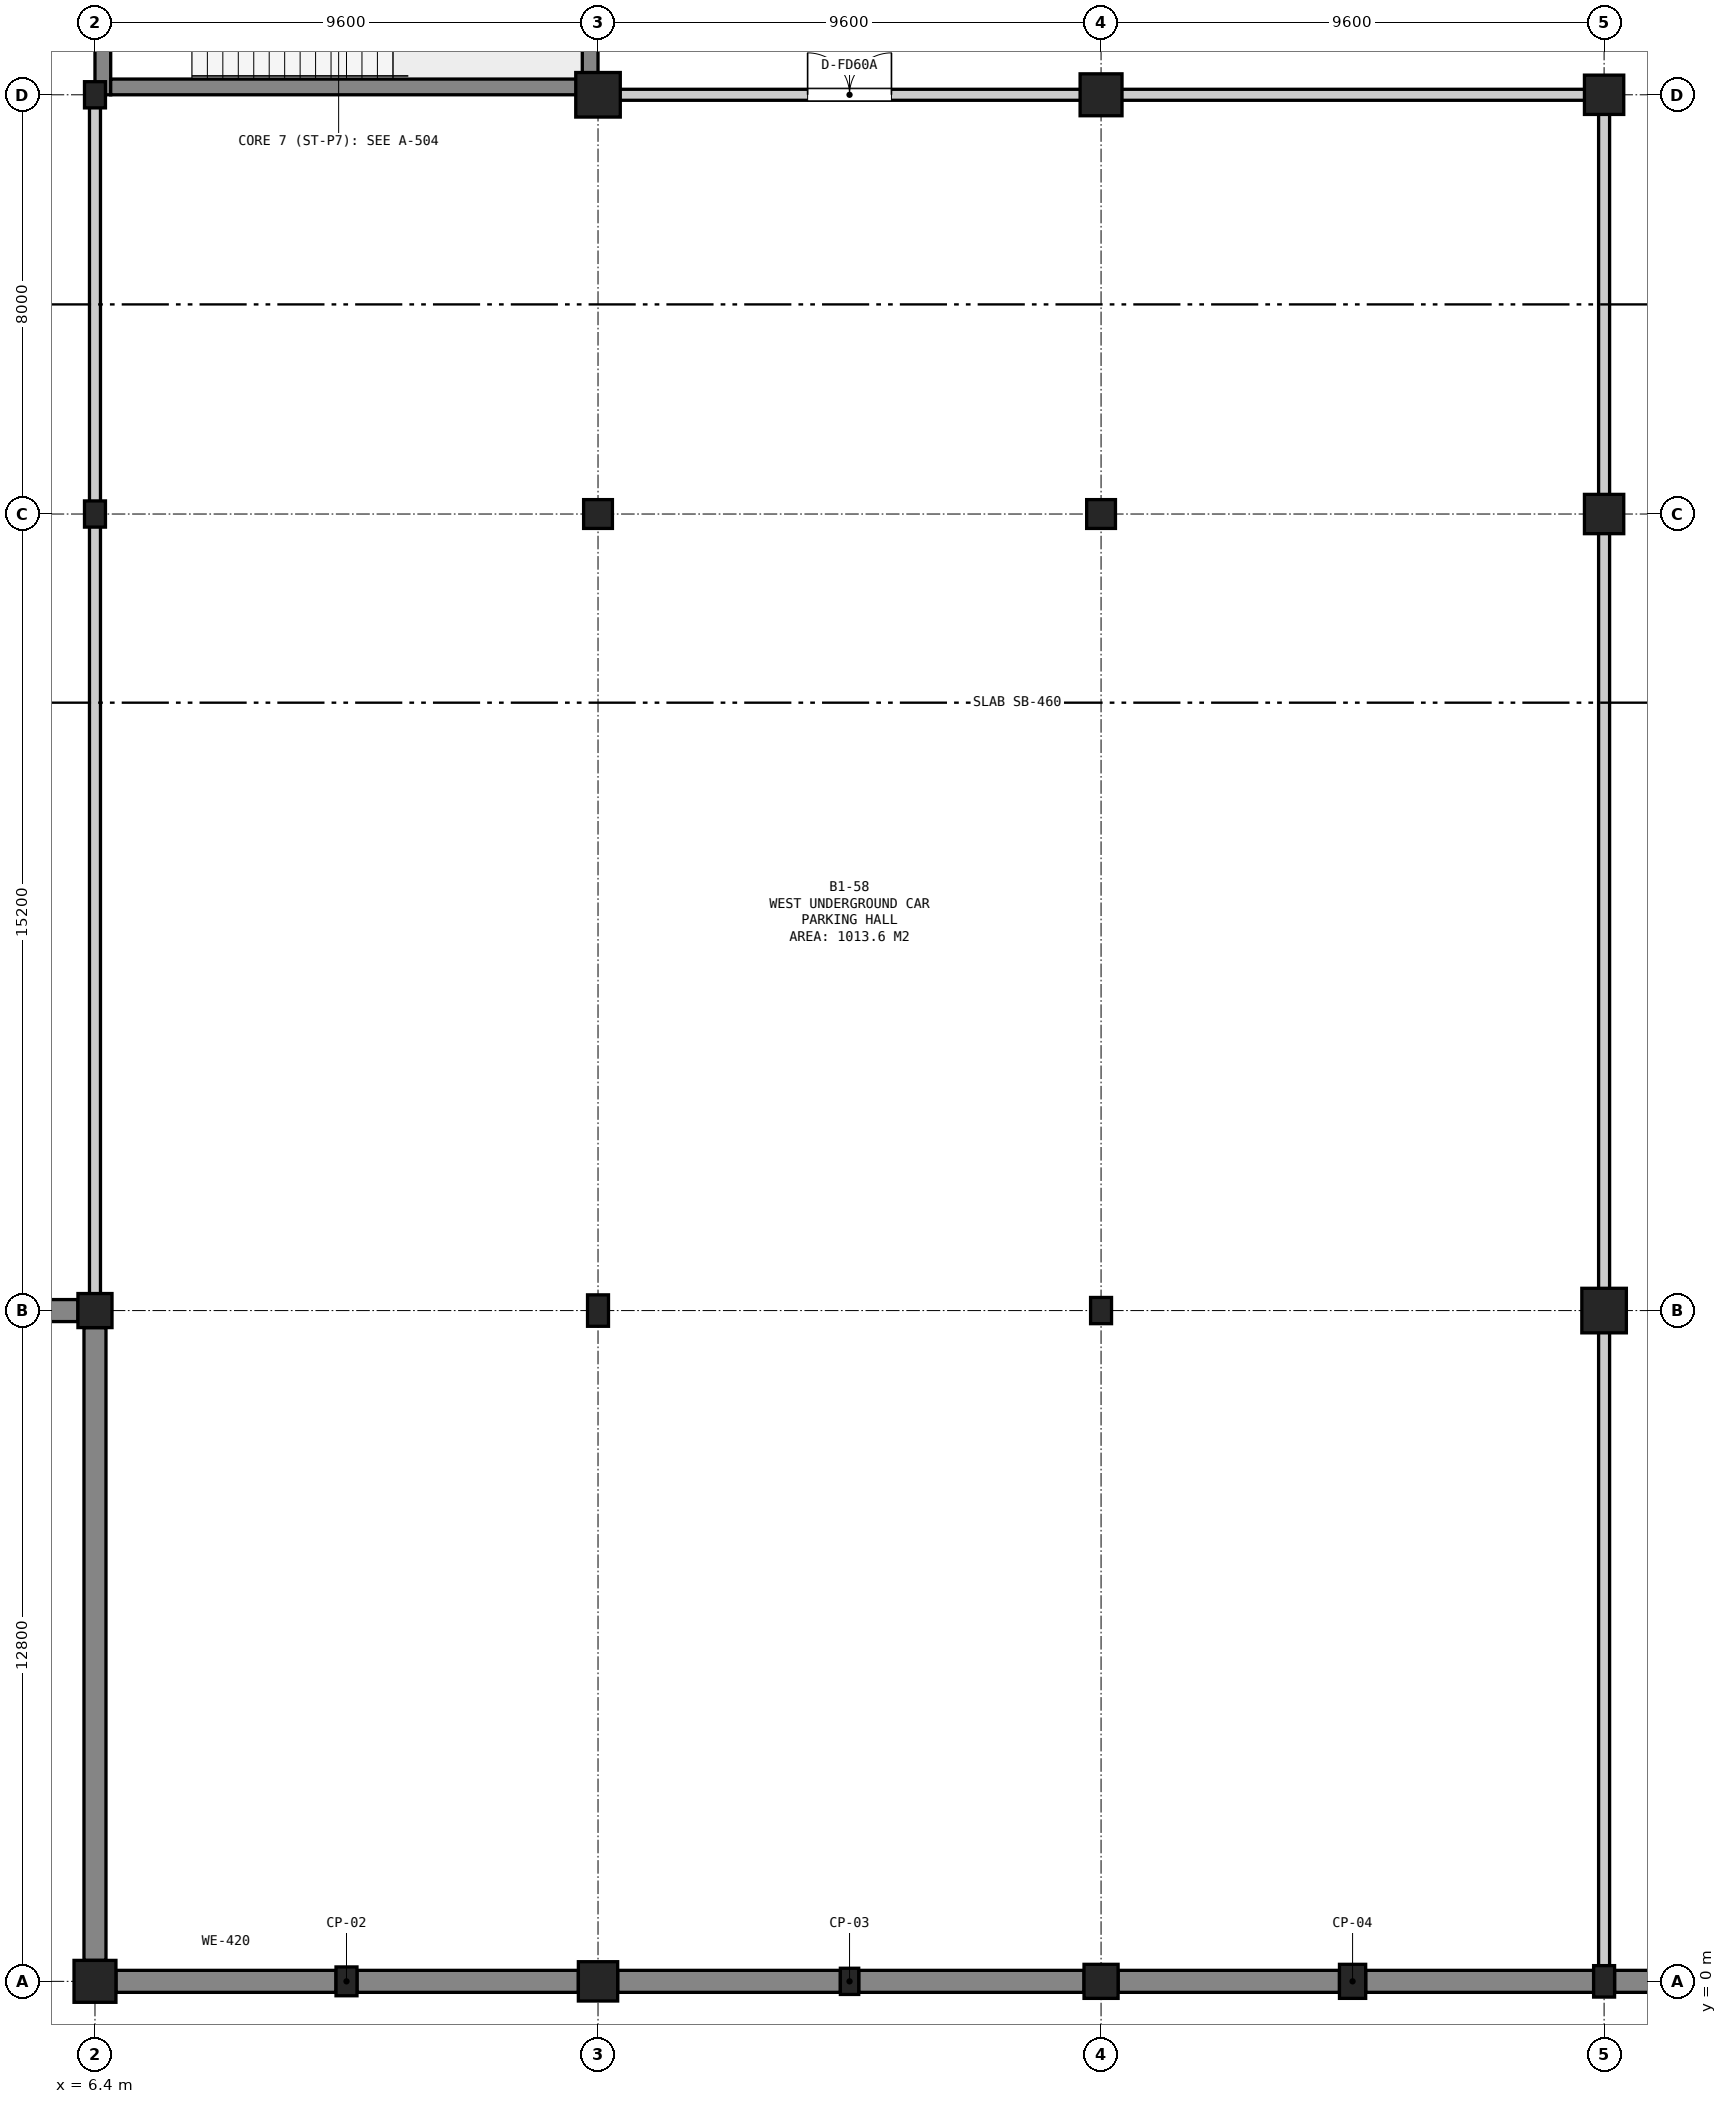
"""IFC4 building model, lengths in metres.
Left out: names, types, materials, properties, quantities, classifications, styles, units other than length and angle.
Written with IfcOpenShell. Run it as: python <this file> out.ifc"""

import sys

from ifc_helpers import new_model, si_unit, direction, frame, frame_2d, origin, origin_2d, place, context, subcontext, project, spatial, rectangle, extrude, element, fill, save


model = new_model("IFC4")
c1 = context("Model", 3, precision=1e-05, world=origin(), true_north=direction((0.0, 1.0)))
c2 = subcontext(c1, "Body", "Model", "MODEL_VIEW")
j1 = project(units=[si_unit("LENGTHUNIT", "METRE"), si_unit("PLANEANGLEUNIT", "RADIAN")], contexts=[c1])
p1 = place(None, origin())
s1 = spatial("IfcSite", under=j1, at=p1, CompositionType="ELEMENT")
p2 = place(p1, origin())
s2 = spatial("IfcBuilding", under=s1, at=p2, CompositionType="ELEMENT")
p3 = place(p2, frame((0.0, 0.0, -4.5)))
s3 = spatial("IfcBuildingStorey", under=s2, at=p3, CompositionType="ELEMENT", Elevation=-4.5)
p4 = place(p3, frame((6.4, 0.0, 0.0), z_axis=(0.0, 0.0, 1.0), x_axis=(1.0, 0.0, 0.0)))
e1 = element("IfcColumn", 1, at=p4, inside=s3, PredefinedType="COLUMN", context=c2, shape_type="SweptSolid", body=[
    extrude(rectangle(XDim=0.8, YDim=0.8, at=origin_2d()), origin(), (0.0, 0.0, 1.0), 4.5),
])
p5 = place(p3, frame((6.4, 12.8, 0.0), z_axis=(0.0, 0.0, 1.0), x_axis=(1.0, 0.0, 0.0)))
e2 = element("IfcColumn", 2, at=p5, inside=s3, PredefinedType="COLUMN", context=c2, shape_type="SweptSolid", body=[
    extrude(rectangle(XDim=0.65, YDim=0.65, at=origin_2d()), origin(), (0.0, 0.0, 1.0), 4.5),
])
for number, where, z_axis, x_axis in (
    (3, (6.4, 28.0, 0.0), (0.0, 0.0, 1.0), (1.0, 0.0, 0.0)),
    (4, (6.4, 36.0, 0.0), (0.0, 0.0, 1.0), (1.0, 0.0, 0.0)),
):
    element("IfcColumn", number, at=place(p3, frame(where, z_axis=z_axis, x_axis=x_axis)), inside=s3, PredefinedType="COLUMN", context=c2, shape_type="SweptSolid", body=[
        extrude(rectangle(XDim=0.4, YDim=0.5, at=origin_2d()), origin(), (0.0, 0.0, 1.0), 4.5),
    ])
p6 = place(p3, frame((16.0, 0.0, 0.0), z_axis=(0.0, 0.0, 1.0), x_axis=(1.0, 0.0, 0.0)))
e5 = element("IfcColumn", 5, at=p6, inside=s3, PredefinedType="COLUMN", context=c2, shape_type="SweptSolid", body=[
    extrude(rectangle(XDim=0.75, YDim=0.75, at=origin_2d()), origin(), (0.0, 0.0, 1.0), 4.5),
])
p7 = place(p3, frame((16.0, 12.8, 0.0), z_axis=(0.0, 0.0, 1.0), x_axis=(1.0, 0.0, 0.0)))
e6 = element("IfcColumn", 6, at=p7, inside=s3, PredefinedType="COLUMN", context=c2, shape_type="SweptSolid", body=[
    extrude(rectangle(XDim=0.4, YDim=0.6, at=origin_2d()), origin(), (0.0, 0.0, 1.0), 4.5),
])
p8 = place(p3, frame((16.0, 28.0, 0.0), z_axis=(0.0, 0.0, 1.0), x_axis=(1.0, 0.0, 0.0)))
e7 = element("IfcColumn", 7, at=p8, inside=s3, PredefinedType="COLUMN", context=c2, shape_type="SweptSolid", body=[
    extrude(rectangle(XDim=0.55, YDim=0.55, at=origin_2d()), origin(), (0.0, 0.0, 1.0), 4.5),
])
p9 = place(p3, frame((16.0, 36.0, 0.0), z_axis=(0.0, 0.0, 1.0), x_axis=(1.0, 0.0, 0.0)))
e8 = element("IfcColumn", 8, at=p9, inside=s3, PredefinedType="COLUMN", context=c2, shape_type="SweptSolid", body=[
    extrude(rectangle(XDim=0.85, YDim=0.85, at=origin_2d()), origin(), (0.0, 0.0, 1.0), 4.5),
])
p10 = place(p3, frame((25.6, 0.0, 0.0), z_axis=(0.0, 0.0, 1.0), x_axis=(1.0, 0.0, 0.0)))
e9 = element("IfcColumn", 9, at=p10, inside=s3, PredefinedType="COLUMN", context=c2, shape_type="SweptSolid", body=[
    extrude(rectangle(XDim=0.65, YDim=0.65, at=origin_2d()), origin(), (0.0, 0.0, 1.0), 4.5),
])
p11 = place(p3, frame((25.6, 12.8, 0.0), z_axis=(0.0, 0.0, 1.0), x_axis=(1.0, 0.0, 0.0)))
e10 = element("IfcColumn", 10, at=p11, inside=s3, PredefinedType="COLUMN", context=c2, shape_type="SweptSolid", body=[
    extrude(rectangle(XDim=0.4, YDim=0.5, at=origin_2d()), origin(), (0.0, 0.0, 1.0), 4.5),
])
p12 = place(p3, frame((25.6, 28.0, 0.0), z_axis=(0.0, 0.0, 1.0), x_axis=(1.0, 0.0, 0.0)))
e11 = element("IfcColumn", 11, at=p12, inside=s3, PredefinedType="COLUMN", context=c2, shape_type="SweptSolid", body=[
    extrude(rectangle(XDim=0.55, YDim=0.55, at=origin_2d()), origin(), (0.0, 0.0, 1.0), 4.5),
])
p13 = place(p3, frame((25.6, 36.0, 0.0), z_axis=(0.0, 0.0, 1.0), x_axis=(1.0, 0.0, 0.0)))
e12 = element("IfcColumn", 12, at=p13, inside=s3, PredefinedType="COLUMN", context=c2, shape_type="SweptSolid", body=[
    extrude(rectangle(XDim=0.8, YDim=0.8, at=origin_2d()), origin(), (0.0, 0.0, 1.0), 4.5),
])
p14 = place(p3, frame((35.2, 0.0, 0.0), z_axis=(0.0, 0.0, 1.0), x_axis=(1.0, 0.0, 0.0)))
e13 = element("IfcColumn", 13, at=p14, inside=s3, PredefinedType="COLUMN", context=c2, shape_type="SweptSolid", body=[
    extrude(rectangle(XDim=0.4, YDim=0.6, at=origin_2d()), origin(), (0.0, 0.0, 1.0), 4.5),
])
p15 = place(p3, frame((35.2, 12.8, 0.0), z_axis=(0.0, 0.0, 1.0), x_axis=(1.0, 0.0, 0.0)))
e14 = element("IfcColumn", 14, at=p15, inside=s3, PredefinedType="COLUMN", context=c2, shape_type="SweptSolid", body=[
    extrude(rectangle(XDim=0.85, YDim=0.85, at=origin_2d()), origin(), (0.0, 0.0, 1.0), 4.5),
])
for number, where, z_axis, x_axis in (
    (15, (35.2, 28.0, 0.0), (0.0, 0.0, 1.0), (1.0, 0.0, 0.0)),
    (16, (35.2, 36.0, 0.0), (0.0, 0.0, 1.0), (1.0, 0.0, 0.0)),
):
    element("IfcColumn", number, at=place(p3, frame(where, z_axis=z_axis, x_axis=x_axis)), inside=s3, PredefinedType="COLUMN", context=c2, shape_type="SweptSolid", body=[
        extrude(rectangle(XDim=0.75, YDim=0.75, at=origin_2d()), origin(), (0.0, 0.0, 1.0), 4.5),
    ])
p16 = place(p3, frame((11.2, 0.0, 0.0), z_axis=(0.0, 0.0, 1.0), x_axis=(1.0, 0.0, 0.0)))
e17 = element("IfcColumn", 17, at=p16, inside=s3, PredefinedType="PILASTER", context=c2, shape_type="SweptSolid", body=[
    extrude(rectangle(XDim=0.4, YDim=0.55, at=origin_2d()), origin(), (0.0, 0.0, 1.0), 4.5),
])
p17 = place(p3, frame((20.8, 0.0, 0.0), z_axis=(0.0, 0.0, 1.0), x_axis=(1.0, 0.0, 0.0)))
e18 = element("IfcColumn", 18, at=p17, inside=s3, PredefinedType="PILASTER", context=c2, shape_type="SweptSolid", body=[
    extrude(rectangle(XDim=0.35, YDim=0.5, at=origin_2d()), origin(), (0.0, 0.0, 1.0), 4.5),
])
p18 = place(p3, frame((30.4, 0.0, 0.0), z_axis=(0.0, 0.0, 1.0), x_axis=(1.0, 0.0, 0.0)))
e19 = element("IfcColumn", 19, at=p18, inside=s3, PredefinedType="PILASTER", context=c2, shape_type="SweptSolid", body=[
    extrude(rectangle(XDim=0.5, YDim=0.65, at=origin_2d()), origin(), (0.0, 0.0, 1.0), 4.5),
])
p19 = place(p3, frame((6.8, 0.0, 0.0), z_axis=(0.0, 0.0, 1.0), x_axis=(1.0, 0.0, 0.0)))
e20 = element("IfcWall", 20, at=p19, inside=s3, PredefinedType="SOLIDWALL", context=c2, shape_type="SweptSolid", body=[
    extrude(rectangle(XDim=4.2, YDim=0.42, at=frame_2d((2.1, 0.0))), origin(), (0.0, 0.0, 1.0), 4.08),
])
p20 = place(p3, frame((11.4, 0.0, 0.0), z_axis=(0.0, 0.0, 1.0), x_axis=(1.0, 0.0, 0.0)))
e21 = element("IfcWall", 21, at=p20, inside=s3, PredefinedType="SOLIDWALL", context=c2, shape_type="SweptSolid", body=[
    extrude(rectangle(XDim=4.225, YDim=0.42, at=frame_2d((2.113, 0.0))), origin(), (0.0, 0.0, 1.0), 4.08),
])
p21 = place(p3, frame((16.375, 0.0, 0.0), z_axis=(0.0, 0.0, 1.0), x_axis=(1.0, 0.0, 0.0)))
e22 = element("IfcWall", 22, at=p21, inside=s3, PredefinedType="SOLIDWALL", context=c2, shape_type="SweptSolid", body=[
    extrude(rectangle(XDim=4.25, YDim=0.42, at=frame_2d((2.125, 0.0))), origin(), (0.0, 0.0, 1.0), 4.08),
])
p22 = place(p3, frame((20.975, 0.0, 0.0), z_axis=(0.0, 0.0, 1.0), x_axis=(1.0, 0.0, 0.0)))
e23 = element("IfcWall", 23, at=p22, inside=s3, PredefinedType="SOLIDWALL", context=c2, shape_type="SweptSolid", body=[
    extrude(rectangle(XDim=4.3, YDim=0.42, at=frame_2d((2.15, 0.0))), origin(), (0.0, 0.0, 1.0), 4.08),
])
p23 = place(p3, frame((25.925, 0.0, 0.0), z_axis=(0.0, 0.0, 1.0), x_axis=(1.0, 0.0, 0.0)))
e24 = element("IfcWall", 24, at=p23, inside=s3, PredefinedType="SOLIDWALL", context=c2, shape_type="SweptSolid", body=[
    extrude(rectangle(XDim=4.225, YDim=0.42, at=frame_2d((2.112, 0.0))), origin(), (0.0, 0.0, 1.0), 4.08),
])
p24 = place(p3, frame((30.65, 0.0, 0.0), z_axis=(0.0, 0.0, 1.0), x_axis=(1.0, 0.0, 0.0)))
e25 = element("IfcWall", 25, at=p24, inside=s3, PredefinedType="SOLIDWALL", context=c2, shape_type="SweptSolid", body=[
    extrude(rectangle(XDim=4.35, YDim=0.42, at=frame_2d((2.175, 0.0))), origin(), (0.0, 0.0, 1.0), 4.08),
])
p25 = place(p3, frame((35.4, 0.0, 0.0), z_axis=(0.0, 0.0, 1.0), x_axis=(1.0, 0.0, 0.0)))
e26 = element("IfcWall", 26, at=p25, inside=s3, PredefinedType="SOLIDWALL", context=c2, shape_type="SweptSolid", body=[
    extrude(rectangle(XDim=6.0, YDim=0.42, at=frame_2d((3.0, 0.0))), origin(), (0.0, 0.0, 1.0), 4.08),
])
p26 = place(p3, frame((0.375, 12.8, 0.0), z_axis=(0.0, 0.0, 1.0), x_axis=(1.0, 0.0, 0.0)))
e27 = element("IfcWall", 27, at=p26, inside=s3, PredefinedType="SOLIDWALL", context=c2, shape_type="SweptSolid", body=[
    extrude(rectangle(XDim=5.7, YDim=0.42, at=frame_2d((2.85, 0.0))), origin(), (0.0, 0.0, 1.0), 4.08),
])
p27 = place(p3, frame((6.4, 12.475, 0.0), z_axis=(0.0, 0.0, 1.0), x_axis=(0.0, -1.0, 0.0)))
e28 = element("IfcWall", 28, at=p27, inside=s3, PredefinedType="SOLIDWALL", context=c2, shape_type="SweptSolid", body=[
    extrude(rectangle(XDim=12.075, YDim=0.42, at=frame_2d((6.038, 0.0))), origin(), (0.0, 0.0, 1.0), 4.08),
])
for number, where, z_axis, x_axis in (
    (29, (6.55, 36.0, 0.0), (0.0, 0.0, 1.0), (0.0, 1.0, 0.0)),
    (30, (15.85, 36.0, 0.0), (0.0, 0.0, 1.0), (0.0, 1.0, 0.0)),
):
    element("IfcWall", number, at=place(p3, frame(where, z_axis=z_axis, x_axis=x_axis)), inside=s3, PredefinedType="SHEAR", context=c2, shape_type="SweptSolid", body=[
        extrude(rectangle(XDim=4.2, YDim=0.3, at=frame_2d((2.1, 0.0))), origin(), (0.0, 0.0, 1.0), 4.08),
    ])
p28 = place(p3, frame((6.7, 36.15, 0.0), z_axis=(0.0, 0.0, 1.0), x_axis=(1.0, 0.0, 0.0)))
e31 = element("IfcWall", 31, at=p28, inside=s3, PredefinedType="SHEAR", context=c2, shape_type="SweptSolid", body=[
    extrude(rectangle(XDim=9.0, YDim=0.3, at=frame_2d((4.5, 0.0))), origin(), (0.0, 0.0, 1.0), 4.08),
])
p29 = place(p3, frame((15.84, 36.0, 0.0), z_axis=(0.0, 0.0, 1.0), x_axis=(1.0, 0.0, 0.0)))
e32 = element("IfcWall", 32, at=p29, inside=s3, PredefinedType="SOLIDWALL", context=c2, shape_type="SweptSolid", body=[
    extrude(rectangle(XDim=19.22, YDim=0.21, at=frame_2d((9.61, 0.0))), origin(), (0.0, 0.0, 1.0), 3.325),
])
p30 = place(p29, frame((4.16, 0.0, 0.0)))
e33 = element("IfcOpeningElement", 33, at=p30, cuts=e32, PredefinedType="OPENING", context=c2, shape_type="SweptSolid", body=[
    extrude(rectangle(XDim=1.6, YDim=2.2, at=frame_2d((0.8, 1.1))), frame((0.0, 0.117, 0.0), z_axis=(0.0, -1.0, 0.0), x_axis=(1.0, 0.0, 0.0)), (0.0, 0.0, 1.0), 0.234),
])
p31 = place(p3, frame((6.4, 12.615, 0.0), z_axis=(0.0, 0.0, 1.0), x_axis=(0.0, 1.0, 0.0)))
e34 = element("IfcWall", 34, at=p31, inside=s3, PredefinedType="SOLIDWALL", context=c2, shape_type="SweptSolid", body=[
    extrude(rectangle(XDim=23.245, YDim=0.21, at=frame_2d((11.623, 0.0))), origin(), (0.0, 0.0, 1.0), 2.925),
])
p32 = place(p3, frame((35.2, 0.225, 0.0), z_axis=(0.0, 0.0, 1.0), x_axis=(0.0, 1.0, 0.0)))
e35 = element("IfcWall", 35, at=p32, inside=s3, PredefinedType="SOLIDWALL", context=c2, shape_type="SweptSolid", body=[
    extrude(rectangle(XDim=35.635, YDim=0.21, at=frame_2d((17.817, 0.0))), origin(), (0.0, 0.0, 1.0), 2.925),
])
p33 = place(p30, origin())
e36 = element("IfcDoor", 36, at=p33, inside=s3, OperationType="DOUBLE_DOOR_SINGLE_SWING", PredefinedType="DOOR", context=c2, shape_type="SweptSolid", body=[
    extrude(rectangle(XDim=1.6, YDim=2.2, at=frame_2d((0.8, 1.1))), frame((0.0, 0.025, 0.0), z_axis=(0.0, -1.0, 0.0), x_axis=(1.0, 0.0, 0.0)), (0.0, 0.0, 1.0), 0.05),
])
fill(e33, e36)
save(model, sys.argv[1])
